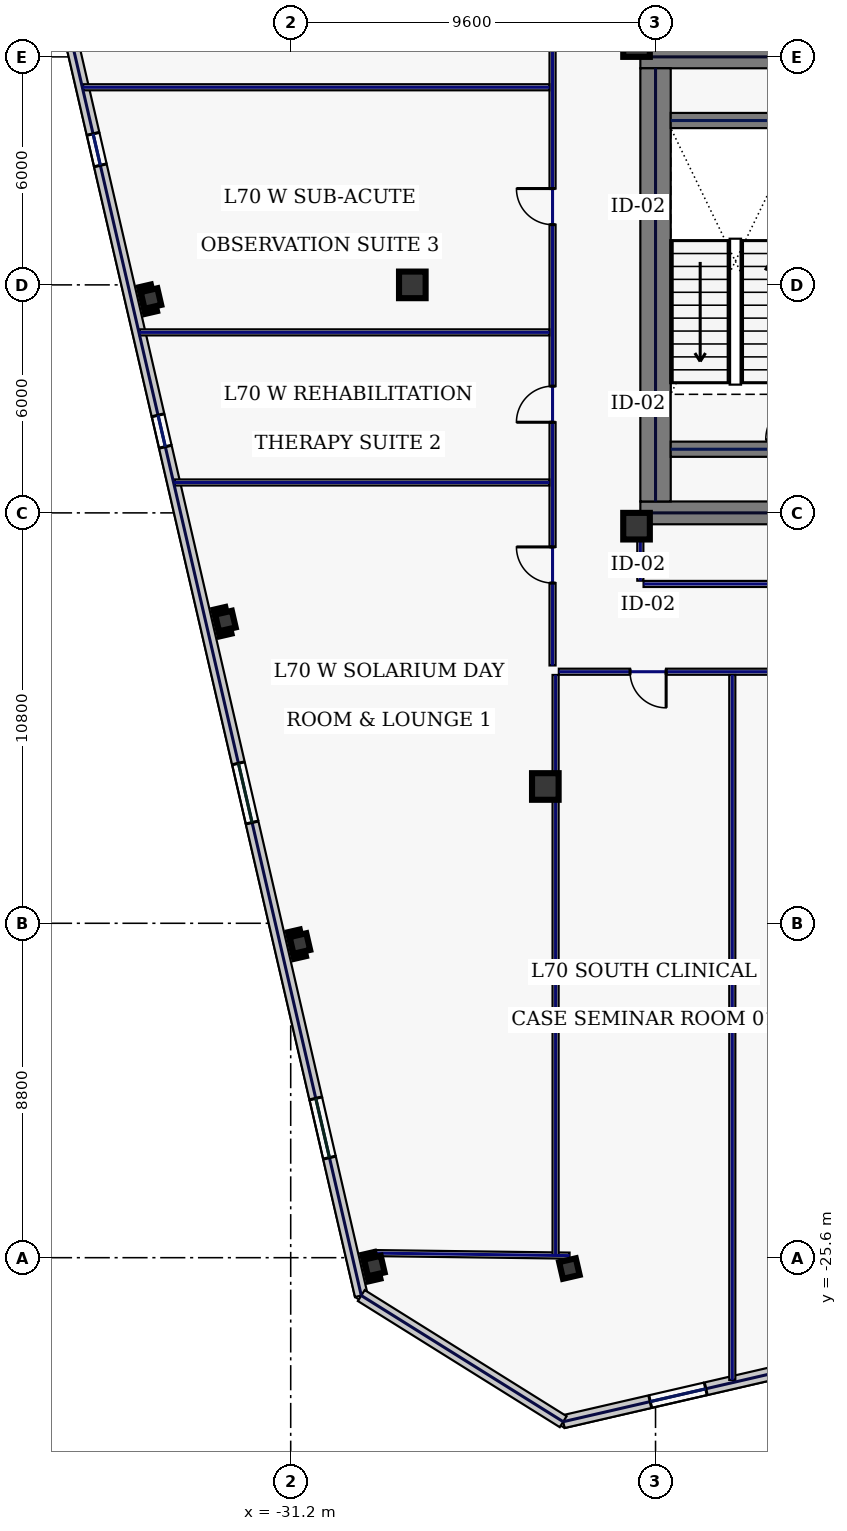
"""IFC4 building model, lengths in metres.
Left out: names, types, materials, properties, quantities, classifications, styles, units other than length and angle.
Written with IfcOpenShell. Run it as: python <this file> out.ifc"""

import sys

from ifc_helpers import new_model, si_unit, direction, frame, frame_2d, origin, origin_2d, place, context, subcontext, project, spatial, rectangle, hollow_rectangle, extrude, element, fill, save


model = new_model("IFC4")
c1 = context("Model", 3, precision=1e-05, world=origin(), true_north=direction((0.0, 1.0)))
c2 = subcontext(c1, "Body", "Model", "MODEL_VIEW")
j1 = project(units=[si_unit("LENGTHUNIT", "METRE"), si_unit("PLANEANGLEUNIT", "RADIAN")], contexts=[c1])
p1 = place(None, origin())
s1 = spatial("IfcSite", under=j1, at=p1, CompositionType="ELEMENT")
p2 = place(p1, origin())
s2 = spatial("IfcBuilding", under=s1, at=p2, CompositionType="ELEMENT")
p3 = place(p2, frame((0.0, 0.0, 301.0)))
s3 = spatial("IfcBuildingStorey", under=s2, at=p3, CompositionType="ELEMENT", Elevation=301.0)
for number, where, z_axis, x_axis in (
    (1, (-22.0, 6.0, 0.0), (0.0, 0.0, 1.0), (1.0, 0.0, 0.0)),
    (2, (-22.0, -6.0, 0.0), (0.0, 0.0, 1.0), (1.0, 0.0, 0.0)),
):
    element("IfcWall", number, at=place(p3, frame(where, z_axis=z_axis, x_axis=x_axis)), inside=s3, PredefinedType="SHEAR", context=c2, shape_type="SweptSolid", body=[
        extrude(rectangle(XDim=11.5, YDim=0.6, at=frame_2d((5.75, 0.0))), origin(), (0.0, 0.0, 1.0), 3.74),
    ])
p4 = place(p3, frame((-21.6, -5.7, 0.0), z_axis=(0.0, 0.0, 1.0), x_axis=(0.0, 1.0, 0.0)))
e3 = element("IfcWall", 3, at=p4, inside=s3, PredefinedType="SHEAR", context=c2, shape_type="SweptSolid", body=[
    extrude(rectangle(XDim=11.4, YDim=0.8, at=frame_2d((5.7, 0.0))), origin(), (0.0, 0.0, 1.0), 3.74),
])
for number, where, z_axis, x_axis in (
    (4, (-21.2, -4.325, 0.0), (0.0, 0.0, 1.0), (1.0, 0.0, 0.0)),
    (5, (-21.2, 4.325, 0.0), (0.0, 0.0, 1.0), (1.0, 0.0, 0.0)),
):
    element("IfcWall", number, at=place(p3, frame(where, z_axis=z_axis, x_axis=x_axis)), inside=s3, PredefinedType="SHEAR", context=c2, shape_type="SweptSolid", body=[
        extrude(rectangle(XDim=3.4, YDim=0.4, at=frame_2d((1.7, 0.0))), origin(), (0.0, 0.0, 1.0), 3.74),
    ])
for number, where, z_axis, x_axis in (
    (6, (-22.1, -6.35, 0.0), (0.0, 0.0, 1.0), (1.0, 0.0, 0.0)),
    (7, (-22.1, 6.35, 0.0), (0.0, 0.0, 1.0), (1.0, 0.0, 0.0)),
    (8, (-24.5, -13.2, 0.0), (0.0, 0.0, 1.0), (1.0, 0.0, 0.0)),
    (9, (-28.0, 0.0, 0.0), (0.0, 0.0, 1.0), (1.0, 0.0, 0.0)),
):
    element("IfcColumn", number, at=place(p3, frame(where, z_axis=z_axis, x_axis=x_axis)), inside=s3, PredefinedType="COLUMN", context=c2, shape_type="SweptSolid", body=[
        extrude(hollow_rectangle(XDim=0.7, YDim=0.7, WallThickness=0.032, at=origin_2d()), origin(), (0.0, 0.0, 1.0), 3.74),
    ])
for number, where, z_axis, x_axis in (
    (10, (-23.867, -25.886, 0.0), (0.0, 0.0, 1.0), (0.974, 0.225, 0.0)),
    (11, (-34.877, -0.359, 0.0), (0.0, 0.0, 1.0), (0.974, 0.225, 0.0)),
    (12, (-32.917, -8.845, 0.0), (0.0, 0.0, 1.0), (0.974, 0.225, 0.0)),
    (13, (-30.958, -17.332, 0.0), (0.0, 0.0, 1.0), (0.974, 0.225, 0.0)),
    (14, (-28.999, -25.819, 0.0), (0.0, 0.0, 1.0), (0.974, 0.225, 0.0)),
):
    element("IfcColumn", number, at=place(p3, frame(where, z_axis=z_axis, x_axis=x_axis)), inside=s3, PredefinedType="COLUMN", context=c2, shape_type="SweptSolid", body=[
        extrude(hollow_rectangle(XDim=0.45, YDim=0.45, WallThickness=0.022, at=origin_2d()), origin(), (0.0, 0.0, 1.0), 3.74),
    ])
p5 = place(p3, frame((-24.03, -29.916, 0.0), z_axis=(0.0, 0.0, 1.0), x_axis=(0.974370978061, 0.224947098473, 0.0)))
e15 = element("IfcWall", 15, at=p5, inside=s3, PredefinedType="STANDARD", context=c2, shape_type="SweptSolid", body=[
    extrude(rectangle(XDim=17.506, YDim=0.34, at=frame_2d((8.753, 0.0))), origin(), (0.0, 0.0, 1.0), 3.74),
])
p6 = place(p5, frame((2.35, 0.0, 0.9)))
e16 = element("IfcOpeningElement", 16, at=p6, cuts=e15, PredefinedType="OPENING", context=c2, shape_type="SweptSolid", body=[
    extrude(rectangle(XDim=1.5, YDim=2.0, at=frame_2d((0.75, 1.0))), frame((0.0, 0.18, 0.0), z_axis=(0.0, -1.0, 0.0), x_axis=(1.0, 0.0, 0.0)), (0.0, 0.0, 1.0), 0.36),
])
p7 = place(p5, frame((5.817, 0.0, 0.9)))
e17 = element("IfcOpeningElement", 17, at=p7, cuts=e15, PredefinedType="OPENING", context=c2, shape_type="SweptSolid", body=[
    extrude(rectangle(XDim=1.5, YDim=2.0, at=frame_2d((0.75, 1.0))), frame((0.0, 0.18, 0.0), z_axis=(0.0, -1.0, 0.0), x_axis=(1.0, 0.0, 0.0)), (0.0, 0.0, 1.0), 0.36),
])
p8 = place(p5, frame((13.353, 0.0, 0.9)))
e18 = element("IfcOpeningElement", 18, at=p8, cuts=e15, PredefinedType="OPENING", context=c2, shape_type="SweptSolid", body=[
    extrude(rectangle(XDim=1.5, YDim=2.0, at=frame_2d((0.75, 1.0))), frame((0.0, 0.18, 0.0), z_axis=(0.0, -1.0, 0.0), x_axis=(1.0, 0.0, 0.0)), (0.0, 0.0, 1.0), 0.36),
])
p9 = place(p3, frame((-37.486, 8.676, 0.0), z_axis=(0.0, 0.0, 1.0), x_axis=(0.224953091034, -0.974369594576, 0.0)))
e19 = element("IfcWall", 19, at=p9, inside=s3, PredefinedType="STANDARD", context=c2, shape_type="SweptSolid", body=[
    extrude(rectangle(XDim=36.2, YDim=0.34, at=frame_2d((18.1, 0.0))), origin(), (0.0, 0.0, 1.0), 3.74),
])
p10 = place(p9, frame((4.825, 0.0, 0.75)))
e20 = element("IfcOpeningElement", 20, at=p10, cuts=e19, PredefinedType="OPENING", context=c2, shape_type="SweptSolid", body=[
    extrude(rectangle(XDim=0.85, YDim=1.85, at=frame_2d((0.425, 0.925))), frame((0.0, 0.18, 0.0), z_axis=(0.0, -1.0, 0.0), x_axis=(1.0, 0.0, 0.0)), (0.0, 0.0, 1.0), 0.36),
])
p11 = place(p9, frame((12.425, 0.0, 0.75)))
e21 = element("IfcOpeningElement", 21, at=p11, cuts=e19, PredefinedType="OPENING", context=c2, shape_type="SweptSolid", body=[
    extrude(rectangle(XDim=0.85, YDim=1.85, at=frame_2d((0.425, 0.925))), frame((0.0, 0.18, 0.0), z_axis=(0.0, -1.0, 0.0), x_axis=(1.0, 0.0, 0.0)), (0.0, 0.0, 1.0), 0.36),
])
p12 = place(p9, frame((21.825, 0.0, 0.58)))
e22 = element("IfcOpeningElement", 22, at=p12, cuts=e19, PredefinedType="OPENING", context=c2, shape_type="SweptSolid", body=[
    extrude(rectangle(XDim=1.6, YDim=2.3, at=frame_2d((0.8, 1.15))), frame((0.0, 0.18, 0.0), z_axis=(0.0, -1.0, 0.0), x_axis=(1.0, 0.0, 0.0)), (0.0, 0.0, 1.0), 0.36),
])
p13 = place(p9, frame((30.875, 0.0, 0.58)))
e23 = element("IfcOpeningElement", 23, at=p13, cuts=e19, PredefinedType="OPENING", context=c2, shape_type="SweptSolid", body=[
    extrude(rectangle(XDim=1.6, YDim=2.3, at=frame_2d((0.8, 1.15))), frame((0.0, 0.18, 0.0), z_axis=(0.0, -1.0, 0.0), x_axis=(1.0, 0.0, 0.0)), (0.0, 0.0, 1.0), 0.36),
])
p14 = place(p3, frame((-29.343, -26.596, 0.0), z_axis=(0.0, 0.0, 1.0), x_axis=(0.848037708252, -0.529935887993, 0.0)))
e24 = element("IfcWall", 24, at=p14, inside=s3, PredefinedType="STANDARD", context=c2, shape_type="SweptSolid", body=[
    extrude(rectangle(XDim=6.265, YDim=0.34, at=frame_2d((3.133, 0.0))), origin(), (0.0, 0.0, 1.0), 3.74),
])
p15 = place(p3, frame((-28.994, -25.479, 0.0), z_axis=(0.0, 0.0, 1.0), x_axis=(0.999915052546, -0.01303409726, 0.0)))
e25 = element("IfcWall", 25, at=p15, inside=s3, PredefinedType="PARTITIONING", context=c2, shape_type="SweptSolid", body=[
    extrude(rectangle(XDim=5.132, YDim=0.16, at=frame_2d((2.566, 0.0))), origin(), (0.0, 0.0, 1.0), 3.74),
])
p16 = place(p3, frame((-24.31, -10.015, 0.0), z_axis=(0.0, 0.0, 1.0), x_axis=(0.0, 1.0, 0.0)))
e26 = element("IfcWall", 26, at=p16, inside=s3, PredefinedType="PARTITIONING", context=c2, shape_type="SweptSolid", body=[
    extrude(rectangle(XDim=20.13, YDim=0.16, at=frame_2d((10.065, 0.0))), origin(), (0.0, 0.0, 1.0), 3.74),
])
p17 = place(p16, frame((2.169, 0.0, 0.0)))
e27 = element("IfcOpeningElement", 27, at=p17, cuts=e26, PredefinedType="OPENING", context=c2, shape_type="SweptSolid", body=[
    extrude(rectangle(XDim=0.95, YDim=2.2, at=frame_2d((0.475, 1.1))), frame((0.0, 0.09, 0.0), z_axis=(0.0, -1.0, 0.0), x_axis=(1.0, 0.0, 0.0)), (0.0, 0.0, 1.0), 0.18),
])
p18 = place(p16, frame((6.4, 0.0, 0.0)))
e28 = element("IfcOpeningElement", 28, at=p18, cuts=e26, PredefinedType="OPENING", context=c2, shape_type="SweptSolid", body=[
    extrude(rectangle(XDim=0.95, YDim=2.2, at=frame_2d((0.475, 1.1))), frame((0.0, 0.09, 0.0), z_axis=(0.0, -1.0, 0.0), x_axis=(1.0, 0.0, 0.0)), (0.0, 0.0, 1.0), 0.18),
])
p19 = place(p16, frame((11.6, 0.0, 0.0)))
e29 = element("IfcOpeningElement", 29, at=p19, cuts=e26, PredefinedType="OPENING", context=c2, shape_type="SweptSolid", body=[
    extrude(rectangle(XDim=0.95, YDim=2.2, at=frame_2d((0.475, 1.1))), frame((0.0, 0.09, 0.0), z_axis=(0.0, -1.0, 0.0), x_axis=(1.0, 0.0, 0.0)), (0.0, 0.0, 1.0), 0.18),
])
p20 = place(p16, frame((17.131, 0.0, 0.0)))
e30 = element("IfcOpeningElement", 30, at=p20, cuts=e26, PredefinedType="OPENING", context=c2, shape_type="SweptSolid", body=[
    extrude(rectangle(XDim=0.95, YDim=2.2, at=frame_2d((0.475, 1.1))), frame((0.0, 0.09, 0.0), z_axis=(0.0, -1.0, 0.0), x_axis=(1.0, 0.0, 0.0)), (0.0, 0.0, 1.0), 0.18),
])
p21 = place(p3, frame((12.535, -10.18, 0.0), z_axis=(0.0, 0.0, 1.0), x_axis=(-1.0, 0.0, 0.0)))
e31 = element("IfcWall", 31, at=p21, inside=s3, PredefinedType="PARTITIONING", context=c2, shape_type="SweptSolid", body=[
    extrude(rectangle(XDim=36.68, YDim=0.16, at=frame_2d((18.34, 0.0))), origin(), (0.0, 0.0, 1.0), 3.74),
])
p22 = place(p21, frame((33.856, 0.0, 0.0)))
e32 = element("IfcOpeningElement", 32, at=p22, cuts=e31, PredefinedType="OPENING", context=c2, shape_type="SweptSolid", body=[
    extrude(rectangle(XDim=0.95, YDim=2.2, at=frame_2d((0.475, 1.1))), frame((0.0, 0.09, 0.0), z_axis=(0.0, -1.0, 0.0), x_axis=(1.0, 0.0, 0.0)), (0.0, 0.0, 1.0), 0.18),
])
p23 = place(p21, frame((29.015, 0.0, 0.0)))
e33 = element("IfcOpeningElement", 33, at=p23, cuts=e31, PredefinedType="OPENING", context=c2, shape_type="SweptSolid", body=[
    extrude(rectangle(XDim=0.95, YDim=2.2, at=frame_2d((0.475, 1.1))), frame((0.0, 0.09, 0.0), z_axis=(0.0, -1.0, 0.0), x_axis=(1.0, 0.0, 0.0)), (0.0, 0.0, 1.0), 0.18),
])
p24 = place(p21, frame((22.935, 0.0, 0.0)))
e34 = element("IfcOpeningElement", 34, at=p24, cuts=e31, PredefinedType="OPENING", context=c2, shape_type="SweptSolid", body=[
    extrude(rectangle(XDim=1.3, YDim=2.2, at=frame_2d((0.65, 1.1))), frame((0.0, 0.09, 0.0), z_axis=(0.0, -1.0, 0.0), x_axis=(1.0, 0.0, 0.0)), (0.0, 0.0, 1.0), 0.18),
])
p25 = place(p21, frame((17.555, 0.0, 0.0)))
e35 = element("IfcOpeningElement", 35, at=p25, cuts=e31, PredefinedType="OPENING", context=c2, shape_type="SweptSolid", body=[
    extrude(rectangle(XDim=1.3, YDim=2.2, at=frame_2d((0.65, 1.1))), frame((0.0, 0.09, 0.0), z_axis=(0.0, -1.0, 0.0), x_axis=(1.0, 0.0, 0.0)), (0.0, 0.0, 1.0), 0.18),
])
p26 = place(p21, frame((9.97, 0.0, 0.0)))
e36 = element("IfcOpeningElement", 36, at=p26, cuts=e31, PredefinedType="OPENING", context=c2, shape_type="SweptSolid", body=[
    extrude(rectangle(XDim=1.3, YDim=2.2, at=frame_2d((0.65, 1.1))), frame((0.0, 0.09, 0.0), z_axis=(0.0, -1.0, 0.0), x_axis=(1.0, 0.0, 0.0)), (0.0, 0.0, 1.0), 0.18),
])
p27 = place(p21, frame((2.329, 0.0, 0.0)))
e37 = element("IfcOpeningElement", 37, at=p27, cuts=e31, PredefinedType="OPENING", context=c2, shape_type="SweptSolid", body=[
    extrude(rectangle(XDim=0.95, YDim=2.2, at=frame_2d((0.475, 1.1))), frame((0.0, 0.09, 0.0), z_axis=(0.0, -1.0, 0.0), x_axis=(1.0, 0.0, 0.0)), (0.0, 0.0, 1.0), 0.18),
])
p28 = place(p3, frame((-22.0, -6.42, 0.0), z_axis=(0.0, 0.0, 1.0), x_axis=(0.0, -1.0, 0.0)))
e38 = element("IfcWall", 38, at=p28, inside=s3, PredefinedType="PARTITIONING", context=c2, shape_type="SweptSolid", body=[
    extrude(rectangle(XDim=1.365, YDim=0.16, at=frame_2d((0.683, 0.0))), origin(), (0.0, 0.0, 1.0), 3.74),
])
p29 = place(p3, frame((-21.915, -7.87, 0.0), z_axis=(0.0, 0.0, 1.0), x_axis=(1.0, 0.0, 0.0)))
e39 = element("IfcWall", 39, at=p29, inside=s3, PredefinedType="PARTITIONING", context=c2, shape_type="SweptSolid", body=[
    extrude(rectangle(XDim=11.2, YDim=0.16, at=frame_2d((5.6, 0.0))), origin(), (0.0, 0.0, 1.0), 3.74),
])
p30 = place(p3, frame((-24.23, -25.536, 0.0), z_axis=(0.0, 0.0, 1.0), x_axis=(0.0, 1.0, 0.0)))
e40 = element("IfcWall", 40, at=p30, inside=s3, PredefinedType="PARTITIONING", context=c2, shape_type="SweptSolid", body=[
    extrude(rectangle(XDim=15.271, YDim=0.16, at=frame_2d((7.635, 0.0))), origin(), (0.0, 0.0, 1.0), 3.335),
])
p31 = place(p3, frame((-19.58, -28.817, 0.0), z_axis=(0.0, 0.0, 1.0), x_axis=(0.0, 1.0, 0.0)))
e41 = element("IfcWall", 41, at=p31, inside=s3, PredefinedType="PARTITIONING", context=c2, shape_type="SweptSolid", body=[
    extrude(rectangle(XDim=18.552, YDim=0.16, at=frame_2d((9.276, 0.0))), origin(), (0.0, 0.0, 1.0), 3.74),
])
p32 = place(p3, frame((-34.262, -5.2, 0.0), z_axis=(0.0, 0.0, 1.0), x_axis=(1.0, 0.0, 0.0)))
e42 = element("IfcWall", 42, at=p32, inside=s3, PredefinedType="PARTITIONING", context=c2, shape_type="SweptSolid", body=[
    extrude(rectangle(XDim=9.867, YDim=0.16, at=frame_2d((4.933, 0.0))), origin(), (0.0, 0.0, 1.0), 3.74),
])
p33 = place(p3, frame((-35.174, -1.25, 0.0), z_axis=(0.0, 0.0, 1.0), x_axis=(1.0, 0.0, 0.0)))
e43 = element("IfcWall", 43, at=p33, inside=s3, PredefinedType="PARTITIONING", context=c2, shape_type="SweptSolid", body=[
    extrude(rectangle(XDim=10.779, YDim=0.16, at=frame_2d((5.389, 0.0))), origin(), (0.0, 0.0, 1.0), 3.74),
])
p34 = place(p3, frame((-36.663, 5.2, 0.0), z_axis=(0.0, 0.0, 1.0), x_axis=(1.0, 0.0, 0.0)))
e44 = element("IfcWall", 44, at=p34, inside=s3, PredefinedType="PARTITIONING", context=c2, shape_type="SweptSolid", body=[
    extrude(rectangle(XDim=12.268, YDim=0.16, at=frame_2d((6.134, 0.0))), origin(), (0.0, 0.0, 1.0), 3.74),
])
p35 = place(p6, origin())
e45 = element("IfcWindow", 45, at=p35, inside=s3, PartitioningType="SINGLE_PANEL", PredefinedType="WINDOW", context=c2, shape_type="SweptSolid", body=[
    extrude(rectangle(XDim=1.5, YDim=2.0, at=frame_2d((0.75, 1.0))), frame((0.0, 0.03, 0.0), z_axis=(0.0, -1.0, 0.0), x_axis=(1.0, 0.0, 0.0)), (0.0, 0.0, 1.0), 0.06),
])
fill(e16, e45)
p36 = place(p10, origin())
e46 = element("IfcWindow", 46, at=p36, inside=s3, PartitioningType="SINGLE_PANEL", PredefinedType="WINDOW", context=c2, shape_type="SweptSolid", body=[
    extrude(rectangle(XDim=0.85, YDim=1.85, at=frame_2d((0.425, 0.925))), frame((0.0, 0.03, 0.0), z_axis=(0.0, -1.0, 0.0), x_axis=(1.0, 0.0, 0.0)), (0.0, 0.0, 1.0), 0.06),
])
fill(e20, e46)
p37 = place(p11, origin())
e47 = element("IfcWindow", 47, at=p37, inside=s3, PartitioningType="SINGLE_PANEL", PredefinedType="WINDOW", context=c2, shape_type="SweptSolid", body=[
    extrude(rectangle(XDim=0.85, YDim=1.85, at=frame_2d((0.425, 0.925))), frame((0.0, 0.03, 0.0), z_axis=(0.0, -1.0, 0.0), x_axis=(1.0, 0.0, 0.0)), (0.0, 0.0, 1.0), 0.06),
])
fill(e21, e47)
p38 = place(p12, origin())
e48 = element("IfcWindow", 48, at=p38, inside=s3, PartitioningType="SINGLE_PANEL", PredefinedType="WINDOW", context=c2, shape_type="SweptSolid", body=[
    extrude(rectangle(XDim=1.6, YDim=2.3, at=frame_2d((0.8, 1.15))), frame((0.0, 0.03, 0.0), z_axis=(0.0, -1.0, 0.0), x_axis=(1.0, 0.0, 0.0)), (0.0, 0.0, 1.0), 0.06),
])
fill(e22, e48)
p39 = place(p13, origin())
e49 = element("IfcWindow", 49, at=p39, inside=s3, PartitioningType="SINGLE_PANEL", PredefinedType="WINDOW", context=c2, shape_type="SweptSolid", body=[
    extrude(rectangle(XDim=1.6, YDim=2.3, at=frame_2d((0.8, 1.15))), frame((0.0, 0.03, 0.0), z_axis=(0.0, -1.0, 0.0), x_axis=(1.0, 0.0, 0.0)), (0.0, 0.0, 1.0), 0.06),
])
fill(e23, e49)
p40 = place(p22, origin())
e50 = element("IfcDoor", 50, at=p40, inside=s3, OperationType="SINGLE_SWING_LEFT", PredefinedType="DOOR", context=c2, shape_type="SweptSolid", body=[
    extrude(rectangle(XDim=0.95, YDim=2.2, at=frame_2d((0.475, 1.1))), frame((0.0, 0.025, 0.0), z_axis=(0.0, -1.0, 0.0), x_axis=(1.0, 0.0, 0.0)), (0.0, 0.0, 1.0), 0.05),
])
fill(e32, e50)
p41 = place(p17, origin())
e51 = element("IfcDoor", 51, at=p41, inside=s3, OperationType="SINGLE_SWING_RIGHT", PredefinedType="DOOR", context=c2, shape_type="SweptSolid", body=[
    extrude(rectangle(XDim=0.95, YDim=2.2, at=frame_2d((0.475, 1.1))), frame((0.0, 0.025, 0.0), z_axis=(0.0, -1.0, 0.0), x_axis=(1.0, 0.0, 0.0)), (0.0, 0.0, 1.0), 0.05),
])
fill(e27, e51)
p42 = place(p18, origin())
e52 = element("IfcDoor", 52, at=p42, inside=s3, OperationType="SINGLE_SWING_LEFT", PredefinedType="DOOR", context=c2, shape_type="SweptSolid", body=[
    extrude(rectangle(XDim=0.95, YDim=2.2, at=frame_2d((0.475, 1.1))), frame((0.0, 0.025, 0.0), z_axis=(0.0, -1.0, 0.0), x_axis=(1.0, 0.0, 0.0)), (0.0, 0.0, 1.0), 0.05),
])
fill(e28, e52)
p43 = place(p19, origin())
e53 = element("IfcDoor", 53, at=p43, inside=s3, OperationType="SINGLE_SWING_RIGHT", PredefinedType="DOOR", context=c2, shape_type="SweptSolid", body=[
    extrude(rectangle(XDim=0.95, YDim=2.2, at=frame_2d((0.475, 1.1))), frame((0.0, 0.025, 0.0), z_axis=(0.0, -1.0, 0.0), x_axis=(1.0, 0.0, 0.0)), (0.0, 0.0, 1.0), 0.05),
])
fill(e29, e53)
save(model, sys.argv[1])
